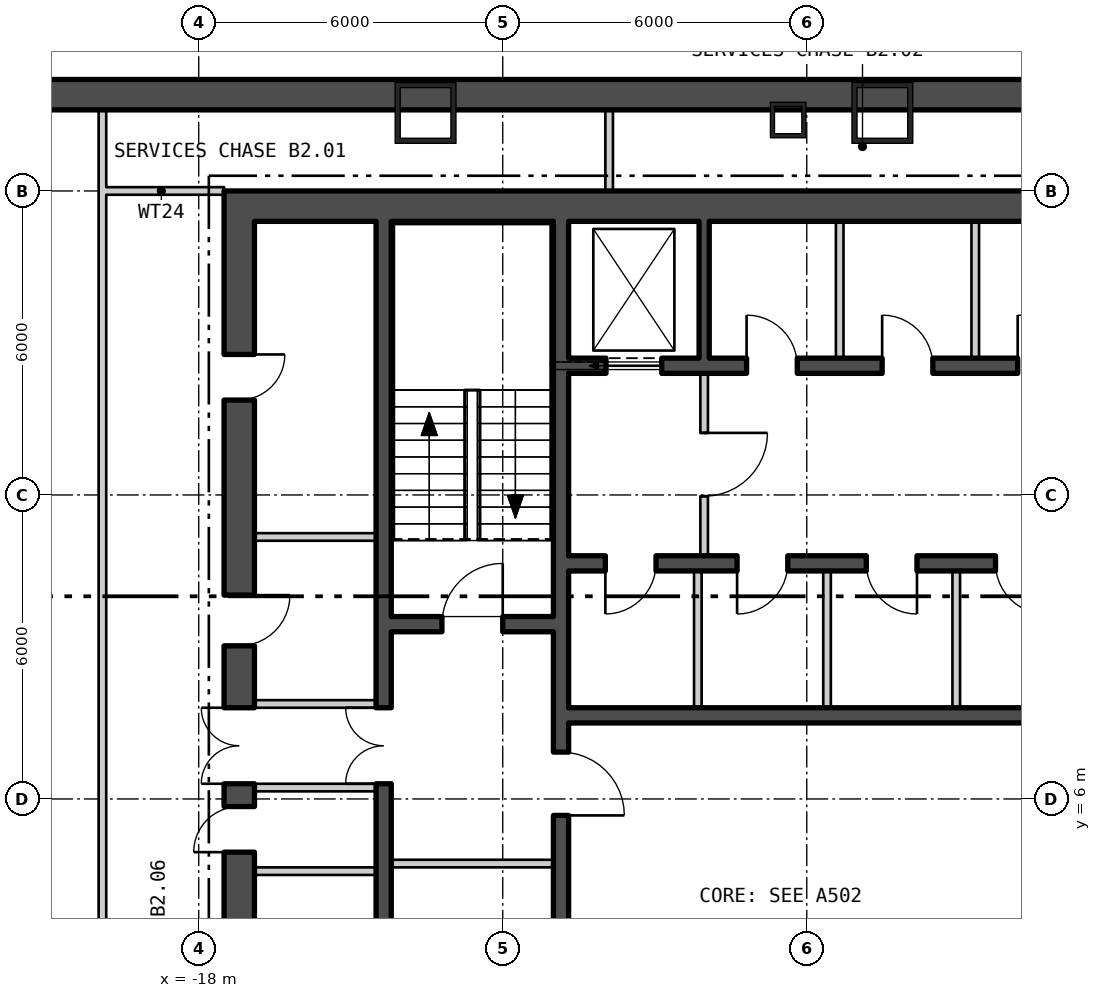
"""IFC4 building model, lengths in metres.
Left out: names, types, materials, properties, quantities, classifications, styles, units other than length and angle.
Written with IfcOpenShell. Run it as: python <this file> out.ifc"""

import sys

from ifc_helpers import new_model, si_unit, direction, frame, frame_2d, origin, origin_2d, place, context, subcontext, project, spatial, rectangle, hollow_rectangle, extrude, element, fill, save


model = new_model("IFC4")
c1 = context("Model", 3, precision=1e-05, world=origin(), true_north=direction((0.0, 1.0)))
c2 = subcontext(c1, "Body", "Model", "MODEL_VIEW")
j1 = project(units=[si_unit("LENGTHUNIT", "METRE"), si_unit("PLANEANGLEUNIT", "RADIAN")], contexts=[c1])
p1 = place(None, origin())
s1 = spatial("IfcSite", under=j1, at=p1, CompositionType="ELEMENT")
p2 = place(p1, origin())
s2 = spatial("IfcBuilding", under=s1, at=p2, CompositionType="ELEMENT")
p3 = place(p2, frame((0.0, 0.0, -11.4)))
s3 = spatial("IfcBuildingStorey", under=s2, at=p3, CompositionType="ELEMENT", Elevation=-11.4)
for number, where, z_axis, x_axis in (
    (1, (-4.508, 19.54, 0.0), (0.0, 0.0, 1.0), (-1.0, 0.0, 0.0)),
    (2, (-13.523, 19.54, 0.0), (0.0, 0.0, 1.0), (-1.0, 0.0, 0.0)),
):
    element("IfcColumn", number, at=place(p3, frame(where, z_axis=z_axis, x_axis=x_axis)), inside=s3, PredefinedType="COLUMN", context=c2, shape_type="SweptSolid", body=[
        extrude(hollow_rectangle(XDim=1.2, YDim=1.2, WallThickness=0.1, at=origin_2d()), origin(), (0.0, 0.0, 1.0), 5.7),
    ])
p4 = place(p3, frame((-6.367, 19.4, 0.0), z_axis=(0.0, 0.0, 1.0), x_axis=(-1.0, 0.0, 0.0)))
e3 = element("IfcColumn", 3, at=p4, inside=s3, PredefinedType="COLUMN", context=c2, shape_type="SweptSolid", body=[
    extrude(hollow_rectangle(XDim=0.7, YDim=0.7, WallThickness=0.08, at=origin_2d()), origin(), (0.0, 0.0, 1.0), 5.7),
])
p5 = place(p3, frame((-39.0, 19.9, -0.4), z_axis=(0.0, 0.0, 1.0), x_axis=(1.0, 0.0, 0.0)))
e4 = element("IfcWall", 4, at=p5, inside=s3, PredefinedType="STANDARD", context=c2, shape_type="SweptSolid", body=[
    extrude(rectangle(XDim=78.0, YDim=0.6, at=frame_2d((39.0, 0.0))), origin(), (0.0, 0.0, 1.0), 5.7),
])
p6 = place(p3, frame((-17.5, 17.7, 0.0), z_axis=(0.0, 0.0, 1.0), x_axis=(1.0, 0.0, 0.0)))
e5 = element("IfcWall", 5, at=p6, inside=s3, PredefinedType="SHEAR", context=c2, shape_type="SweptSolid", body=[
    extrude(rectangle(XDim=35.0, YDim=0.6, at=frame_2d((17.5, 0.0))), origin(), (0.0, 0.0, 1.0), 5.25),
])
p7 = place(p3, frame((-17.2, 0.6, 0.0), z_axis=(0.0, 0.0, 1.0), x_axis=(0.0, 1.0, 0.0)))
e6 = element("IfcWall", 6, at=p7, inside=s3, PredefinedType="SHEAR", context=c2, shape_type="SweptSolid", body=[
    extrude(rectangle(XDim=16.8, YDim=0.6, at=frame_2d((8.4, 0.0))), origin(), (0.0, 0.0, 1.0), 5.25),
])
p8 = place(p7, frame((5.7, 0.0, 0.0)))
e7 = element("IfcOpeningElement", 7, at=p8, cuts=e6, PredefinedType="OPENING", context=c2, shape_type="SweptSolid", body=[
    extrude(rectangle(XDim=1.5, YDim=2.1, at=frame_2d((0.75, 1.05))), frame((0.0, 0.31, 0.0), z_axis=(0.0, -1.0, 0.0), x_axis=(1.0, 0.0, 0.0)), (0.0, 0.0, 1.0), 0.62),
])
p9 = place(p7, frame((1.5, 0.0, 0.0)))
e8 = element("IfcOpeningElement", 8, at=p9, cuts=e6, PredefinedType="OPENING", context=c2, shape_type="SweptSolid", body=[
    extrude(rectangle(XDim=0.9, YDim=2.1, at=frame_2d((0.45, 1.05))), frame((0.0, 0.31, 0.0), z_axis=(0.0, -1.0, 0.0), x_axis=(1.0, 0.0, 0.0)), (0.0, 0.0, 1.0), 0.62),
])
p10 = place(p7, frame((4.35, 0.0, 0.0)))
e9 = element("IfcOpeningElement", 9, at=p10, cuts=e6, PredefinedType="OPENING", context=c2, shape_type="SweptSolid", body=[
    extrude(rectangle(XDim=0.9, YDim=2.1, at=frame_2d((0.45, 1.05))), frame((0.0, 0.31, 0.0), z_axis=(0.0, -1.0, 0.0), x_axis=(1.0, 0.0, 0.0)), (0.0, 0.0, 1.0), 0.62),
])
p11 = place(p7, frame((8.423, 0.0, 0.0)))
e10 = element("IfcOpeningElement", 10, at=p11, cuts=e6, PredefinedType="OPENING", context=c2, shape_type="SweptSolid", body=[
    extrude(rectangle(XDim=1.0, YDim=2.1, at=frame_2d((0.5, 1.05))), frame((0.0, 0.31, 0.0), z_axis=(0.0, -1.0, 0.0), x_axis=(1.0, 0.0, 0.0)), (0.0, 0.0, 1.0), 0.62),
])
p12 = place(p7, frame((13.273, 0.0, 0.0)))
e11 = element("IfcOpeningElement", 11, at=p12, cuts=e6, PredefinedType="OPENING", context=c2, shape_type="SweptSolid", body=[
    extrude(rectangle(XDim=0.9, YDim=2.1, at=frame_2d((0.45, 1.05))), frame((0.0, 0.31, 0.0), z_axis=(0.0, -1.0, 0.0), x_axis=(1.0, 0.0, 0.0)), (0.0, 0.0, 1.0), 0.62),
])
p13 = place(p3, frame((-10.85, 0.6, 0.0), z_axis=(0.0, 0.0, 1.0), x_axis=(0.0, 1.0, 0.0)))
e12 = element("IfcWall", 12, at=p13, inside=s3, PredefinedType="SHEAR", context=c2, shape_type="SweptSolid", body=[
    extrude(rectangle(XDim=16.8, YDim=0.3, at=frame_2d((8.4, 0.0))), origin(), (0.0, 0.0, 1.0), 5.25),
])
p14 = place(p13, frame((5.075, 0.0, 0.0)))
e13 = element("IfcOpeningElement", 13, at=p14, cuts=e12, PredefinedType="OPENING", context=c2, shape_type="SweptSolid", body=[
    extrude(rectangle(XDim=1.25, YDim=2.1, at=frame_2d((0.625, 1.05))), frame((0.0, 0.16, 0.0), z_axis=(0.0, -1.0, 0.0), x_axis=(1.0, 0.0, 0.0)), (0.0, 0.0, 1.0), 0.32),
])
p15 = place(p13, frame((1.525, 0.0, 0.0)))
e14 = element("IfcOpeningElement", 14, at=p15, cuts=e12, PredefinedType="OPENING", context=c2, shape_type="SweptSolid", body=[
    extrude(rectangle(XDim=1.0, YDim=2.1, at=frame_2d((0.5, 1.05))), frame((0.0, 0.16, 0.0), z_axis=(0.0, -1.0, 0.0), x_axis=(1.0, 0.0, 0.0)), (0.0, 0.0, 1.0), 0.32),
])
p16 = place(p3, frame((-14.35, 0.6, 0.0), z_axis=(0.0, 0.0, 1.0), x_axis=(0.0, 1.0, 0.0)))
e15 = element("IfcWall", 15, at=p16, inside=s3, PredefinedType="SHEAR", context=c2, shape_type="SweptSolid", body=[
    extrude(rectangle(XDim=16.8, YDim=0.3, at=frame_2d((8.4, 0.0))), origin(), (0.0, 0.0, 1.0), 5.25),
])
p17 = place(p16, frame((5.7, 0.0, 0.0)))
e16 = element("IfcOpeningElement", 16, at=p17, cuts=e15, PredefinedType="OPENING", context=c2, shape_type="SweptSolid", body=[
    extrude(rectangle(XDim=1.5, YDim=2.1, at=frame_2d((0.75, 1.05))), frame((0.0, 0.16, 0.0), z_axis=(0.0, -1.0, 0.0), x_axis=(1.0, 0.0, 0.0)), (0.0, 0.0, 1.0), 0.32),
])
p18 = place(p3, frame((-14.2, 9.45, 0.0), z_axis=(0.0, 0.0, 1.0), x_axis=(1.0, 0.0, 0.0)))
e17 = element("IfcWall", 17, at=p18, inside=s3, PredefinedType="SHEAR", context=c2, shape_type="SweptSolid", body=[
    extrude(rectangle(XDim=3.2, YDim=0.3, at=frame_2d((1.6, 0.0))), origin(), (0.0, 0.0, 1.0), 5.25),
])
p19 = place(p18, frame((1.0, 0.0, 0.0)))
e18 = element("IfcOpeningElement", 18, at=p19, cuts=e17, PredefinedType="OPENING", context=c2, shape_type="SweptSolid", body=[
    extrude(rectangle(XDim=1.2, YDim=2.1, at=frame_2d((0.6, 1.05))), frame((0.0, 0.16, 0.0), z_axis=(0.0, -1.0, 0.0), x_axis=(1.0, 0.0, 0.0)), (0.0, 0.0, 1.0), 0.32),
])
p20 = place(p3, frame((-10.7, 14.55, 0.0), z_axis=(0.0, 0.0, 1.0), x_axis=(1.0, 0.0, 0.0)))
e19 = element("IfcWall", 19, at=p20, inside=s3, PredefinedType="SHEAR", context=c2, shape_type="SweptSolid", body=[
    extrude(rectangle(XDim=21.4, YDim=0.3, at=frame_2d((10.7, 0.0))), origin(), (0.0, 0.0, 1.0), 5.25),
])
p21 = place(p20, frame((0.738, 0.0, 0.0)))
e20 = element("IfcOpeningElement", 20, at=p21, cuts=e19, PredefinedType="OPENING", context=c2, shape_type="SweptSolid", body=[
    extrude(rectangle(XDim=1.1, YDim=2.1, at=frame_2d((0.55, 1.05))), frame((0.0, 0.16, 0.0), z_axis=(0.0, -1.0, 0.0), x_axis=(1.0, 0.0, 0.0)), (0.0, 0.0, 1.0), 0.32),
])
p22 = place(p20, frame((19.562, 0.0, 0.0)))
e21 = element("IfcOpeningElement", 21, at=p22, cuts=e19, PredefinedType="OPENING", context=c2, shape_type="SweptSolid", body=[
    extrude(rectangle(XDim=1.1, YDim=2.1, at=frame_2d((0.55, 1.05))), frame((0.0, 0.16, 0.0), z_axis=(0.0, -1.0, 0.0), x_axis=(1.0, 0.0, 0.0)), (0.0, 0.0, 1.0), 0.32),
])
p23 = place(p20, frame((3.513, 0.0, 0.0)))
e22 = element("IfcOpeningElement", 22, at=p23, cuts=e19, PredefinedType="OPENING", context=c2, shape_type="SweptSolid", body=[
    extrude(rectangle(XDim=1.0, YDim=2.1, at=frame_2d((0.5, 1.05))), frame((0.0, 0.16, 0.0), z_axis=(0.0, -1.0, 0.0), x_axis=(1.0, 0.0, 0.0)), (0.0, 0.0, 1.0), 0.32),
])
p24 = place(p20, frame((6.188, 0.0, 0.0)))
e23 = element("IfcOpeningElement", 23, at=p24, cuts=e19, PredefinedType="OPENING", context=c2, shape_type="SweptSolid", body=[
    extrude(rectangle(XDim=1.0, YDim=2.1, at=frame_2d((0.5, 1.05))), frame((0.0, 0.16, 0.0), z_axis=(0.0, -1.0, 0.0), x_axis=(1.0, 0.0, 0.0)), (0.0, 0.0, 1.0), 0.32),
])
p25 = place(p20, frame((8.863, 0.0, 0.0)))
e24 = element("IfcOpeningElement", 24, at=p25, cuts=e19, PredefinedType="OPENING", context=c2, shape_type="SweptSolid", body=[
    extrude(rectangle(XDim=1.0, YDim=2.1, at=frame_2d((0.5, 1.05))), frame((0.0, 0.16, 0.0), z_axis=(0.0, -1.0, 0.0), x_axis=(1.0, 0.0, 0.0)), (0.0, 0.0, 1.0), 0.32),
])
p26 = place(p20, frame((14.213, 0.0, 0.0)))
e25 = element("IfcOpeningElement", 25, at=p26, cuts=e19, PredefinedType="OPENING", context=c2, shape_type="SweptSolid", body=[
    extrude(rectangle(XDim=1.0, YDim=2.1, at=frame_2d((0.5, 1.05))), frame((0.0, 0.16, 0.0), z_axis=(0.0, -1.0, 0.0), x_axis=(1.0, 0.0, 0.0)), (0.0, 0.0, 1.0), 0.32),
])
p27 = place(p3, frame((-10.7, 10.65, 0.0), z_axis=(0.0, 0.0, 1.0), x_axis=(1.0, 0.0, 0.0)))
e26 = element("IfcWall", 26, at=p27, inside=s3, PredefinedType="SHEAR", context=c2, shape_type="SweptSolid", body=[
    extrude(rectangle(XDim=10.3, YDim=0.3, at=frame_2d((5.15, 0.0))), origin(), (0.0, 0.0, 1.0), 5.25),
])
p28 = place(p27, frame((0.725, 0.0, 0.0)))
e27 = element("IfcOpeningElement", 27, at=p28, cuts=e26, PredefinedType="OPENING", context=c2, shape_type="SweptSolid", body=[
    extrude(rectangle(XDim=1.0, YDim=2.1, at=frame_2d((0.5, 1.05))), frame((0.0, 0.16, 0.0), z_axis=(0.0, -1.0, 0.0), x_axis=(1.0, 0.0, 0.0)), (0.0, 0.0, 1.0), 0.32),
])
p29 = place(p27, frame((3.325, 0.0, 0.0)))
e28 = element("IfcOpeningElement", 28, at=p29, cuts=e26, PredefinedType="OPENING", context=c2, shape_type="SweptSolid", body=[
    extrude(rectangle(XDim=1.0, YDim=2.1, at=frame_2d((0.5, 1.05))), frame((0.0, 0.16, 0.0), z_axis=(0.0, -1.0, 0.0), x_axis=(1.0, 0.0, 0.0)), (0.0, 0.0, 1.0), 0.32),
])
p30 = place(p27, frame((5.875, 0.0, 0.0)))
e29 = element("IfcOpeningElement", 29, at=p30, cuts=e26, PredefinedType="OPENING", context=c2, shape_type="SweptSolid", body=[
    extrude(rectangle(XDim=1.0, YDim=2.1, at=frame_2d((0.5, 1.05))), frame((0.0, 0.16, 0.0), z_axis=(0.0, -1.0, 0.0), x_axis=(1.0, 0.0, 0.0)), (0.0, 0.0, 1.0), 0.32),
])
p31 = place(p27, frame((8.425, 0.0, 0.0)))
e30 = element("IfcOpeningElement", 30, at=p31, cuts=e26, PredefinedType="OPENING", context=c2, shape_type="SweptSolid", body=[
    extrude(rectangle(XDim=1.0, YDim=2.1, at=frame_2d((0.5, 1.05))), frame((0.0, 0.16, 0.0), z_axis=(0.0, -1.0, 0.0), x_axis=(1.0, 0.0, 0.0)), (0.0, 0.0, 1.0), 0.32),
])
p32 = place(p3, frame((-10.7, 7.65, 0.0), z_axis=(0.0, 0.0, 1.0), x_axis=(1.0, 0.0, 0.0)))
e31 = element("IfcWall", 31, at=p32, inside=s3, PredefinedType="SHEAR", context=c2, shape_type="SweptSolid", body=[
    extrude(rectangle(XDim=10.3, YDim=0.3, at=frame_2d((5.15, 0.0))), origin(), (0.0, 0.0, 1.0), 5.25),
])
p33 = place(p3, frame((-8.025, 14.7, 0.0), z_axis=(0.0, 0.0, 1.0), x_axis=(0.0, 1.0, 0.0)))
e32 = element("IfcWall", 32, at=p33, inside=s3, PredefinedType="SHEAR", context=c2, shape_type="SweptSolid", body=[
    extrude(rectangle(XDim=2.7, YDim=0.2, at=frame_2d((1.35, 0.0))), origin(), (0.0, 0.0, 1.0), 5.25),
])
for number, where, z_axis, x_axis in (
    (33, (-5.35, 14.7, 0.0), (0.0, 0.0, 1.0), (0.0, 1.0, 0.0)),
    (34, (-2.675, 14.7, 0.0), (0.0, 0.0, 1.0), (0.0, 1.0, 0.0)),
    (35, (-8.15, 7.8, 0.0), (0.0, 0.0, 1.0), (0.0, 1.0, 0.0)),
    (36, (-5.6, 7.8, 0.0), (0.0, 0.0, 1.0), (0.0, 1.0, 0.0)),
    (37, (-3.05, 7.8, 0.0), (0.0, 0.0, 1.0), (0.0, 1.0, 0.0)),
):
    element("IfcWall", number, at=place(p3, frame(where, z_axis=z_axis, x_axis=x_axis)), inside=s3, PredefinedType="PARTITIONING", context=c2, shape_type="SweptSolid", body=[
        extrude(rectangle(XDim=2.7, YDim=0.15, at=frame_2d((1.35, 0.0))), origin(), (0.0, 0.0, 1.0), 5.25),
    ])
p34 = place(p3, frame((-8.025, 10.8, 0.0), z_axis=(0.0, 0.0, 1.0), x_axis=(0.0, 1.0, 0.0)))
e38 = element("IfcWall", 38, at=p34, inside=s3, PredefinedType="PARTITIONING", context=c2, shape_type="SweptSolid", body=[
    extrude(rectangle(XDim=3.6, YDim=0.15, at=frame_2d((1.8, 0.0))), origin(), (0.0, 0.0, 1.0), 5.25),
])
p35 = place(p34, frame((1.175, 0.0, 0.0)))
e39 = element("IfcOpeningElement", 39, at=p35, cuts=e38, PredefinedType="OPENING", context=c2, shape_type="SweptSolid", body=[
    extrude(rectangle(XDim=1.25, YDim=2.1, at=frame_2d((0.625, 1.05))), frame((0.0, 0.085, 0.0), z_axis=(0.0, -1.0, 0.0), x_axis=(1.0, 0.0, 0.0)), (0.0, 0.0, 1.0), 0.17),
])
p36 = place(p3, frame((-14.2, 4.725, 0.0), z_axis=(0.0, 0.0, 1.0), x_axis=(1.0, 0.0, 0.0)))
e40 = element("IfcWall", 40, at=p36, inside=s3, PredefinedType="PARTITIONING", context=c2, shape_type="SweptSolid", body=[
    extrude(rectangle(XDim=3.2, YDim=0.15, at=frame_2d((1.6, 0.0))), origin(), (0.0, 0.0, 1.0), 5.25),
])
for number, where, z_axis, x_axis in (
    (41, (-16.9, 6.225, 0.0), (0.0, 0.0, 1.0), (1.0, 0.0, 0.0)),
    (42, (-16.9, 7.875, 0.0), (0.0, 0.0, 1.0), (1.0, 0.0, 0.0)),
    (43, (-16.9, 4.575, 0.0), (0.0, 0.0, 1.0), (1.0, 0.0, 0.0)),
    (44, (-16.9, 11.171, 0.0), (0.0, 0.0, 1.0), (1.0, 0.0, 0.0)),
):
    element("IfcWall", number, at=place(p3, frame(where, z_axis=z_axis, x_axis=x_axis)), inside=s3, PredefinedType="PARTITIONING", context=c2, shape_type="SweptSolid", body=[
        extrude(rectangle(XDim=2.4, YDim=0.15, at=frame_2d((1.2, 0.0))), origin(), (0.0, 0.0, 1.0), 5.25),
    ])
p37 = place(p3, frame((-19.975, 18.0, 0.0), z_axis=(0.0, 0.0, 1.0), x_axis=(1.0, 0.0, 0.0)))
e45 = element("IfcWall", 45, at=p37, inside=s3, PredefinedType="PARTITIONING", context=c2, shape_type="SweptSolid", body=[
    extrude(rectangle(XDim=2.475, YDim=0.15, at=frame_2d((1.238, 0.0))), origin(), (0.0, 0.0, 1.0), 5.25),
])
p38 = place(p3, frame((-19.9, 1.101, 0.0), z_axis=(0.0, 0.0, 1.0), x_axis=(0.0, 1.0, 0.0)))
e46 = element("IfcWall", 46, at=p38, inside=s3, PredefinedType="PARTITIONING", context=c2, shape_type="SweptSolid", body=[
    extrude(rectangle(XDim=16.824, YDim=0.15, at=frame_2d((8.412, 0.0))), origin(), (0.0, 0.0, 1.0), 5.25),
])
p39 = place(p3, frame((-19.9, 18.075, 0.0), z_axis=(0.0, 0.0, 1.0), x_axis=(0.0, 1.0, 0.0)))
e47 = element("IfcWall", 47, at=p39, inside=s3, PredefinedType="PARTITIONING", context=c2, shape_type="SweptSolid", body=[
    extrude(rectangle(XDim=1.675, YDim=0.15, at=frame_2d((0.838, 0.0))), origin(), (0.0, 0.0, 1.0), 5.25),
])
p40 = place(p3, frame((-9.9, 18.0, 0.0), z_axis=(0.0, 0.0, 1.0), x_axis=(0.0, 1.0, 0.0)))
e48 = element("IfcWall", 48, at=p40, inside=s3, PredefinedType="PARTITIONING", context=c2, shape_type="SweptSolid", body=[
    extrude(rectangle(XDim=1.75, YDim=0.15, at=frame_2d((0.875, 0.0))), origin(), (0.0, 0.0, 1.0), 5.25),
])
p41 = place(p21, origin())
e49 = element("IfcDoor", 49, at=p41, inside=s3, OperationType="SLIDING_TO_LEFT", PredefinedType="DOOR", context=c2, shape_type="SweptSolid", body=[
    extrude(rectangle(XDim=1.1, YDim=2.1, at=frame_2d((0.55, 1.05))), frame((0.0, 0.025, 0.0), z_axis=(0.0, -1.0, 0.0), x_axis=(1.0, 0.0, 0.0)), (0.0, 0.0, 1.0), 0.05),
])
fill(e20, e49)
p42 = place(p23, origin())
e50 = element("IfcDoor", 50, at=p42, inside=s3, OperationType="SINGLE_SWING_RIGHT", PredefinedType="DOOR", context=c2, shape_type="SweptSolid", body=[
    extrude(rectangle(XDim=1.0, YDim=2.1, at=frame_2d((0.5, 1.05))), frame((0.0, 0.025, 0.0), z_axis=(0.0, -1.0, 0.0), x_axis=(1.0, 0.0, 0.0)), (0.0, 0.0, 1.0), 0.05),
])
fill(e22, e50)
p43 = place(p24, origin())
e51 = element("IfcDoor", 51, at=p43, inside=s3, OperationType="SINGLE_SWING_RIGHT", PredefinedType="DOOR", context=c2, shape_type="SweptSolid", body=[
    extrude(rectangle(XDim=1.0, YDim=2.1, at=frame_2d((0.5, 1.05))), frame((0.0, 0.025, 0.0), z_axis=(0.0, -1.0, 0.0), x_axis=(1.0, 0.0, 0.0)), (0.0, 0.0, 1.0), 0.05),
])
fill(e23, e51)
p44 = place(p25, origin())
e52 = element("IfcDoor", 52, at=p44, inside=s3, OperationType="SINGLE_SWING_RIGHT", PredefinedType="DOOR", context=c2, shape_type="SweptSolid", body=[
    extrude(rectangle(XDim=1.0, YDim=2.1, at=frame_2d((0.5, 1.05))), frame((0.0, 0.025, 0.0), z_axis=(0.0, -1.0, 0.0), x_axis=(1.0, 0.0, 0.0)), (0.0, 0.0, 1.0), 0.05),
])
fill(e24, e52)
p45 = place(p28, origin())
e53 = element("IfcDoor", 53, at=p45, inside=s3, OperationType="SINGLE_SWING_LEFT", PredefinedType="DOOR", context=c2, shape_type="SweptSolid", body=[
    extrude(rectangle(XDim=1.0, YDim=2.1, at=frame_2d((0.5, 1.05))), frame((0.0, 0.025, 0.0), z_axis=(0.0, -1.0, 0.0), x_axis=(1.0, 0.0, 0.0)), (0.0, 0.0, 1.0), 0.05),
])
fill(e27, e53)
p46 = place(p29, origin())
e54 = element("IfcDoor", 54, at=p46, inside=s3, OperationType="SINGLE_SWING_LEFT", PredefinedType="DOOR", context=c2, shape_type="SweptSolid", body=[
    extrude(rectangle(XDim=1.0, YDim=2.1, at=frame_2d((0.5, 1.05))), frame((0.0, 0.025, 0.0), z_axis=(0.0, -1.0, 0.0), x_axis=(1.0, 0.0, 0.0)), (0.0, 0.0, 1.0), 0.05),
])
fill(e28, e54)
p47 = place(p30, origin())
e55 = element("IfcDoor", 55, at=p47, inside=s3, OperationType="SINGLE_SWING_RIGHT", PredefinedType="DOOR", context=c2, shape_type="SweptSolid", body=[
    extrude(rectangle(XDim=1.0, YDim=2.1, at=frame_2d((0.5, 1.05))), frame((0.0, 0.025, 0.0), z_axis=(0.0, -1.0, 0.0), x_axis=(1.0, 0.0, 0.0)), (0.0, 0.0, 1.0), 0.05),
])
fill(e29, e55)
p48 = place(p31, origin())
e56 = element("IfcDoor", 56, at=p48, inside=s3, OperationType="SINGLE_SWING_RIGHT", PredefinedType="DOOR", context=c2, shape_type="SweptSolid", body=[
    extrude(rectangle(XDim=1.0, YDim=2.1, at=frame_2d((0.5, 1.05))), frame((0.0, 0.025, 0.0), z_axis=(0.0, -1.0, 0.0), x_axis=(1.0, 0.0, 0.0)), (0.0, 0.0, 1.0), 0.05),
])
fill(e30, e56)
p49 = place(p35, origin())
e57 = element("IfcDoor", 57, at=p49, inside=s3, OperationType="SINGLE_SWING_RIGHT", PredefinedType="DOOR", context=c2, shape_type="SweptSolid", body=[
    extrude(rectangle(XDim=1.25, YDim=2.1, at=frame_2d((0.625, 1.05))), frame((0.0, 0.025, 0.0), z_axis=(0.0, -1.0, 0.0), x_axis=(1.0, 0.0, 0.0)), (0.0, 0.0, 1.0), 0.05),
])
fill(e39, e57)
p50 = place(p19, origin())
e58 = element("IfcDoor", 58, at=p50, inside=s3, OperationType="SINGLE_SWING_LEFT", PredefinedType="DOOR", context=c2, shape_type="SweptSolid", body=[
    extrude(rectangle(XDim=1.2, YDim=2.1, at=frame_2d((0.6, 1.05))), frame((0.0, 0.025, 0.0), z_axis=(0.0, -1.0, 0.0), x_axis=(1.0, 0.0, 0.0)), (0.0, 0.0, 1.0), 0.05),
])
fill(e18, e58)
p51 = place(p14, origin())
e59 = element("IfcDoor", 59, at=p51, inside=s3, OperationType="SINGLE_SWING_LEFT", PredefinedType="DOOR", context=c2, shape_type="SweptSolid", body=[
    extrude(rectangle(XDim=1.25, YDim=2.1, at=frame_2d((0.625, 1.05))), frame((0.0, 0.025, 0.0), z_axis=(0.0, -1.0, 0.0), x_axis=(1.0, 0.0, 0.0)), (0.0, 0.0, 1.0), 0.05),
])
fill(e13, e59)
p52 = place(p17, origin())
e60 = element("IfcDoor", 60, at=p52, inside=s3, OperationType="DOUBLE_DOOR_SINGLE_SWING", PredefinedType="DOOR", context=c2, shape_type="SweptSolid", body=[
    extrude(rectangle(XDim=1.5, YDim=2.1, at=frame_2d((0.75, 1.05))), frame((0.0, 0.025, 0.0), z_axis=(0.0, -1.0, 0.0), x_axis=(1.0, 0.0, 0.0)), (0.0, 0.0, 1.0), 0.05),
])
fill(e16, e60)
p53 = place(p8, origin())
e61 = element("IfcDoor", 61, at=p53, inside=s3, OperationType="DOUBLE_DOOR_SINGLE_SWING", PredefinedType="DOOR", context=c2, shape_type="SweptSolid", body=[
    extrude(rectangle(XDim=1.5, YDim=2.1, at=frame_2d((0.75, 1.05))), frame((0.0, 0.025, 0.0), z_axis=(0.0, -1.0, 0.0), x_axis=(1.0, 0.0, 0.0)), (0.0, 0.0, 1.0), 0.05),
])
fill(e7, e61)
p54 = place(p10, origin())
e62 = element("IfcDoor", 62, at=p54, inside=s3, OperationType="SINGLE_SWING_RIGHT", PredefinedType="DOOR", context=c2, shape_type="SweptSolid", body=[
    extrude(rectangle(XDim=0.9, YDim=2.1, at=frame_2d((0.45, 1.05))), frame((0.0, 0.025, 0.0), z_axis=(0.0, -1.0, 0.0), x_axis=(1.0, 0.0, 0.0)), (0.0, 0.0, 1.0), 0.05),
])
fill(e9, e62)
p55 = place(p11, origin())
e63 = element("IfcDoor", 63, at=p55, inside=s3, OperationType="SINGLE_SWING_RIGHT", PredefinedType="DOOR", context=c2, shape_type="SweptSolid", body=[
    extrude(rectangle(XDim=1.0, YDim=2.1, at=frame_2d((0.5, 1.05))), frame((0.0, 0.025, 0.0), z_axis=(0.0, -1.0, 0.0), x_axis=(1.0, 0.0, 0.0)), (0.0, 0.0, 1.0), 0.05),
])
fill(e10, e63)
p56 = place(p12, origin())
e64 = element("IfcDoor", 64, at=p56, inside=s3, OperationType="SINGLE_SWING_RIGHT", PredefinedType="DOOR", context=c2, shape_type="SweptSolid", body=[
    extrude(rectangle(XDim=0.9, YDim=2.1, at=frame_2d((0.45, 1.05))), frame((0.0, 0.025, 0.0), z_axis=(0.0, -1.0, 0.0), x_axis=(1.0, 0.0, 0.0)), (0.0, 0.0, 1.0), 0.05),
])
fill(e11, e64)
save(model, sys.argv[1])
